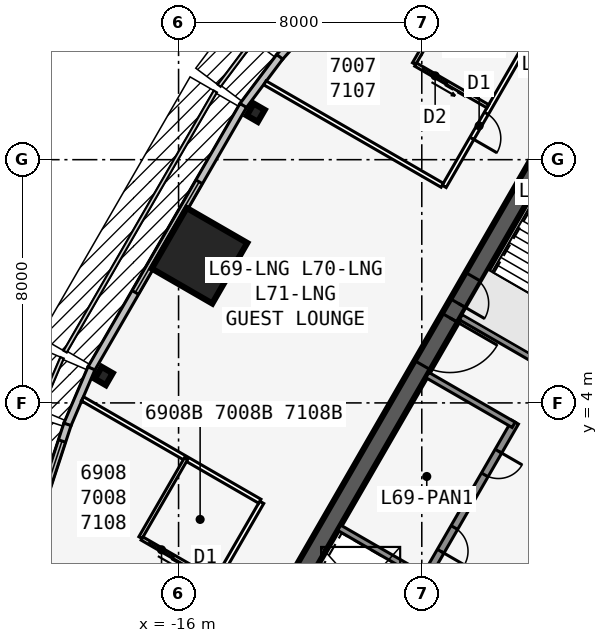
"""IFC4 building model, lengths in metres.
Left out: names, types, materials, properties, quantities, classifications, styles, units other than length and angle.
Written with IfcOpenShell. Run it as: python <this file> out.ifc"""

import sys

from ifc_helpers import new_model, si_unit, direction, frame, frame_2d, origin, origin_2d, place, context, subcontext, project, spatial, rectangle, i_section, extrude, element, fill, save


model = new_model("IFC4")
c1 = context("Model", 3, precision=1e-05, world=origin(), true_north=direction((0.0, 1.0)))
c2 = subcontext(c1, "Body", "Model", "MODEL_VIEW")
j1 = project(units=[si_unit("LENGTHUNIT", "METRE"), si_unit("PLANEANGLEUNIT", "RADIAN")], contexts=[c1])
p1 = place(None, origin())
s1 = spatial("IfcSite", under=j1, at=p1, CompositionType="ELEMENT")
p2 = place(p1, origin())
s2 = spatial("IfcBuilding", under=s1, at=p2, CompositionType="ELEMENT")
p3 = place(p2, frame((0.0, 0.0, 260.9)))
s3 = spatial("IfcBuildingStorey", under=s2, at=p3, CompositionType="ELEMENT", Elevation=260.9)
p4 = place(p3, frame((0.0, 19.052, 0.0), z_axis=(0.0, 0.0, 1.0), x_axis=(-0.499999749417, -0.866025548458, 0.0)))
e1 = element("IfcWall", 1, at=p4, inside=s3, PredefinedType="SHEAR", context=c2, shape_type="SweptSolid", body=[
    extrude(rectangle(XDim=33.0, YDim=0.6, at=frame_2d((16.5, 0.0))), origin(), (0.0, 0.0, 1.0), 3.6),
])
p5 = place(p4, frame((14.15, 0.0, 0.0)))
e2 = element("IfcOpeningElement", 2, at=p5, cuts=e1, PredefinedType="OPENING", context=c2, shape_type="SweptSolid", body=[
    extrude(rectangle(XDim=1.8, YDim=2.13, at=frame_2d((0.9, 1.065))), frame((0.0, 0.31, 0.0), z_axis=(0.0, -1.0, 0.0), x_axis=(1.0, 0.0, 0.0)), (0.0, 0.0, 1.0), 0.62),
])
p6 = place(p4, frame((12.6, 0.0, 0.0)))
e3 = element("IfcOpeningElement", 3, at=p6, cuts=e1, PredefinedType="OPENING", context=c2, shape_type="SweptSolid", body=[
    extrude(rectangle(XDim=1.0, YDim=2.13, at=frame_2d((0.5, 1.065))), frame((0.0, 0.31, 0.0), z_axis=(0.0, -1.0, 0.0), x_axis=(1.0, 0.0, 0.0)), (0.0, 0.0, 1.0), 0.62),
])
p7 = place(p3, frame((-4.929, 3.365, 0.0), z_axis=(0.0, 0.0, 1.0), x_axis=(-0.499991433582, -0.866030349552, 0.0)))
e4 = element("IfcWall", 4, at=p7, inside=s3, PredefinedType="SOLIDWALL", context=c2, shape_type="SweptSolid", body=[
    extrude(rectangle(XDim=10.633, YDim=0.25, at=frame_2d((5.316, 0.0))), origin(), (0.0, 0.0, 1.0), 3.435),
])
p8 = place(p7, frame((9.164, 0.0, 0.0)))
e5 = element("IfcOpeningElement", 5, at=p8, cuts=e4, PredefinedType="OPENING", context=c2, shape_type="SweptSolid", body=[
    extrude(rectangle(XDim=0.9, YDim=2.13, at=frame_2d((0.45, 1.065))), frame((0.0, 0.135, 0.0), z_axis=(0.0, -1.0, 0.0), x_axis=(1.0, 0.0, 0.0)), (0.0, 0.0, 1.0), 0.27),
])
p9 = place(p7, frame((1.1, 0.0, 0.0)))
e6 = element("IfcOpeningElement", 6, at=p9, cuts=e4, PredefinedType="OPENING", context=c2, shape_type="SweptSolid", body=[
    extrude(rectangle(XDim=0.9, YDim=2.13, at=frame_2d((0.45, 1.065))), frame((0.0, 0.135, 0.0), z_axis=(0.0, -1.0, 0.0), x_axis=(1.0, 0.0, 0.0)), (0.0, 0.0, 1.0), 0.27),
])
p10 = place(p7, frame((4.0, 0.0, 0.0)))
e7 = element("IfcOpeningElement", 7, at=p10, cuts=e4, PredefinedType="OPENING", context=c2, shape_type="SweptSolid", body=[
    extrude(rectangle(XDim=0.9, YDim=2.13, at=frame_2d((0.45, 1.065))), frame((0.0, 0.135, 0.0), z_axis=(0.0, -1.0, 0.0), x_axis=(1.0, 0.0, 0.0)), (0.0, 0.0, 1.0), 0.27),
])
for number, where, z_axis, x_axis in (
    (8, (-3.879, 5.184, 0.0), (0.0, 0.0, 1.0), (-0.866, 0.5, 0.0)),
    (9, (-4.979, 3.279, 0.0), (0.0, 0.0, 1.0), (-0.866, 0.5, 0.0)),
    (10, (-7.879, -1.744, 0.0), (0.0, 0.0, 1.0), (-0.866, 0.5, 0.0)),
):
    element("IfcWall", number, at=place(p3, frame(where, z_axis=z_axis, x_axis=x_axis)), inside=s3, PredefinedType="SOLIDWALL", context=c2, shape_type="SweptSolid", body=[
        extrude(rectangle(XDim=3.275, YDim=0.2, at=frame_2d((1.637, 0.0))), origin(), (0.0, 0.0, 1.0), 3.435),
    ])
for number, where, z_axis, x_axis in (
    (11, (-13.461, 13.545, 0.0), (0.0, 0.0, 1.0), (-0.866, 0.5, 0.0)),
    (12, (-18.461, 4.885, 0.0), (0.0, 0.0, 1.0), (-0.866, 0.5, 0.0)),
):
    element("IfcColumn", number, at=place(p3, frame(where, z_axis=z_axis, x_axis=x_axis)), inside=s3, PredefinedType="COLUMN", context=c2, shape_type="SweptSolid", body=[
        extrude(i_section(OverallWidth=0.419, OverallDepth=0.455, WebThickness=0.042, FlangeThickness=0.068, at=origin_2d()), origin(), (0.0, 0.0, 1.0), 3.6),
    ])
p11 = place(p3, frame((-15.312, 8.84, 0.0), z_axis=(0.0, 0.0, 1.0), x_axis=(-0.866025403784, 0.5, 0.0)))
e13 = element("IfcColumn", 13, at=p11, inside=s3, PredefinedType="COLUMN", context=c2, shape_type="SweptSolid", body=[
    extrude(rectangle(XDim=2.3, YDim=2.3, at=origin_2d()), origin(), (0.0, 0.0, 1.0), 3.6),
])
p12 = place(p3, frame((-7.907, 20.701, 0.0), z_axis=(0.0, 0.0, 1.0), x_axis=(-0.667303550892, -0.744785855778, 0.0)))
e14 = element("IfcWall", 14, at=p12, inside=s3, PredefinedType="STANDARD", context=c2, shape_type="SweptSolid", body=[
    extrude(rectangle(XDim=7.153, YDim=0.25, at=frame_2d((3.576, 0.0))), origin(), (0.0, 0.0, 1.0), 3.435),
])
p13 = place(p12, frame((2.376, 0.0, 0.45)))
e15 = element("IfcOpeningElement", 15, at=p13, cuts=e14, PredefinedType="OPENING", context=c2, shape_type="SweptSolid", body=[
    extrude(rectangle(XDim=4.2, YDim=2.6, at=frame_2d((2.1, 1.3))), frame((0.0, 0.135, 0.0), z_axis=(0.0, -1.0, 0.0), x_axis=(1.0, 0.0, 0.0)), (0.0, 0.0, 1.0), 0.27),
])
p14 = place(p3, frame((-12.673, 15.382, 0.0), z_axis=(0.0, 0.0, 1.0), x_axis=(-0.599650843534, -0.800261748335, 0.0)))
e16 = element("IfcWall", 16, at=p14, inside=s3, PredefinedType="STANDARD", context=c2, shape_type="SweptSolid", body=[
    extrude(rectangle(XDim=2.014, YDim=0.25, at=frame_2d((1.007, 0.0))), origin(), (0.0, 0.0, 1.0), 3.435),
])
p15 = place(p3, frame((-13.873, 13.783, 0.0), z_axis=(0.0, 0.0, 1.0), x_axis=(-0.499993662806, -0.866029062534, 0.0)))
e17 = element("IfcWall", 17, at=p15, inside=s3, PredefinedType="STANDARD", context=c2, shape_type="SweptSolid", body=[
    extrude(rectangle(XDim=10.0, YDim=0.25, at=frame_2d((5.0, 0.0))), origin(), (0.0, 0.0, 1.0), 3.435),
])
p16 = place(p15, frame((2.9, 0.0, 0.45)))
e18 = element("IfcOpeningElement", 18, at=p16, cuts=e17, PredefinedType="OPENING", context=c2, shape_type="SweptSolid", body=[
    extrude(rectangle(XDim=4.2, YDim=2.6, at=frame_2d((2.1, 1.3))), frame((0.0, 0.135, 0.0), z_axis=(0.0, -1.0, 0.0), x_axis=(1.0, 0.0, 0.0)), (0.0, 0.0, 1.0), 0.27),
])
p17 = place(p3, frame((-18.866, 5.136, 0.0), z_axis=(0.0, 0.0, 1.0), x_axis=(-0.393290226175, -0.91941437774, 0.0)))
e19 = element("IfcWall", 19, at=p17, inside=s3, PredefinedType="STANDARD", context=c2, shape_type="SweptSolid", body=[
    extrude(rectangle(XDim=2.014, YDim=0.25, at=frame_2d((1.007, 0.0))), origin(), (0.0, 0.0, 1.0), 3.435),
])
p18 = place(p3, frame((-19.654, 3.294, 0.0), z_axis=(0.0, 0.0, 1.0), x_axis=(-0.311328857048, -0.95030223759, 0.0)))
e20 = element("IfcWall", 20, at=p18, inside=s3, PredefinedType="STANDARD", context=c2, shape_type="SweptSolid", body=[
    extrude(rectangle(XDim=7.153, YDim=0.25, at=frame_2d((3.576, 0.0))), origin(), (0.0, 0.0, 1.0), 3.435),
])
p19 = place(p18, frame((0.577, 0.0, 0.45)))
e21 = element("IfcOpeningElement", 21, at=p19, cuts=e20, PredefinedType="OPENING", context=c2, shape_type="SweptSolid", body=[
    extrude(rectangle(XDim=4.2, YDim=2.6, at=frame_2d((2.1, 1.3))), frame((0.0, 0.135, 0.0), z_axis=(0.0, -1.0, 0.0), x_axis=(1.0, 0.0, 0.0)), (0.0, 0.0, 1.0), 0.27),
])
p20 = place(p3, frame((-0.35, 23.096, 0.0), z_axis=(0.0, 0.0, 1.0), x_axis=(-0.499996044987, -0.8660276872, 0.0)))
e22 = element("IfcWall", 22, at=p20, inside=s3, PredefinedType="PARTITIONING", context=c2, shape_type="SweptSolid", body=[
    extrude(rectangle(XDim=13.827, YDim=0.15, at=frame_2d((6.913, 0.0))), origin(), (0.0, 0.0, 1.0), 3.435),
])
p21 = place(p20, frame((3.652, 0.0, 0.0)))
e23 = element("IfcOpeningElement", 23, at=p21, cuts=e22, PredefinedType="OPENING", context=c2, shape_type="SweptSolid", body=[
    extrude(rectangle(XDim=0.95, YDim=2.13, at=frame_2d((0.475, 1.065))), frame((0.0, 0.085, 0.0), z_axis=(0.0, -1.0, 0.0), x_axis=(1.0, 0.0, 0.0)), (0.0, 0.0, 1.0), 0.17),
])
p22 = place(p20, frame((11.052, 0.0, 0.0)))
e24 = element("IfcOpeningElement", 24, at=p22, cuts=e22, PredefinedType="OPENING", context=c2, shape_type="SweptSolid", body=[
    extrude(rectangle(XDim=0.95, YDim=2.13, at=frame_2d((0.475, 1.065))), frame((0.0, 0.085, 0.0), z_axis=(0.0, -1.0, 0.0), x_axis=(1.0, 0.0, 0.0)), (0.0, 0.0, 1.0), 0.17),
])
p23 = place(p3, frame((-13.263, 0.729, 0.0), z_axis=(0.0, 0.0, 1.0), x_axis=(-0.500001642027, -0.866024455758, 0.0)))
e25 = element("IfcWall", 25, at=p23, inside=s3, PredefinedType="PARTITIONING", context=c2, shape_type="SweptSolid", body=[
    extrude(rectangle(XDim=13.827, YDim=0.15, at=frame_2d((6.914, 0.0))), origin(), (0.0, 0.0, 1.0), 3.435),
])
p24 = place(p23, frame((3.225, 0.0, 0.0)))
e26 = element("IfcOpeningElement", 26, at=p24, cuts=e25, PredefinedType="OPENING", context=c2, shape_type="SweptSolid", body=[
    extrude(rectangle(XDim=0.95, YDim=2.13, at=frame_2d((0.475, 1.065))), frame((0.0, 0.085, 0.0), z_axis=(0.0, -1.0, 0.0), x_axis=(1.0, 0.0, 0.0)), (0.0, 0.0, 1.0), 0.17),
])
p25 = place(p23, frame((9.225, 0.0, 0.0)))
e27 = element("IfcOpeningElement", 27, at=p25, cuts=e25, PredefinedType="OPENING", context=c2, shape_type="SweptSolid", body=[
    extrude(rectangle(XDim=0.95, YDim=2.13, at=frame_2d((0.475, 1.065))), frame((0.0, 0.085, 0.0), z_axis=(0.0, -1.0, 0.0), x_axis=(1.0, 0.0, 0.0)), (0.0, 0.0, 1.0), 0.17),
])
for number, where, z_axis, x_axis in (
    (28, (-7.329, 11.159, 0.0), (0.0, 0.0, 1.0), (-0.866, 0.5, 0.0)),
    (29, (-13.329, 0.767, 0.0), (0.0, 0.0, 1.0), (-0.866, 0.5, 0.0)),
):
    element("IfcWall", number, at=place(p3, frame(where, z_axis=z_axis, x_axis=x_axis)), inside=s3, PredefinedType="PARTITIONING", context=c2, shape_type="SweptSolid", body=[
        extrude(rectangle(XDim=6.732, YDim=0.15, at=frame_2d((3.366, 0.0))), origin(), (0.0, 0.0, 1.0), 3.435),
    ])
p26 = place(p3, frame((-6.753, 17.755, 0.0), z_axis=(0.0, 0.0, 1.0), x_axis=(-0.50002537861, -0.866010750942, 0.0)))
e30 = element("IfcWall", 30, at=p26, inside=s3, PredefinedType="PLUMBINGWALL", context=c2, shape_type="SweptSolid", body=[
    extrude(rectangle(XDim=3.0, YDim=0.12, at=frame_2d((1.5, 0.0))), origin(), (0.0, 0.0, 1.0), 3.435),
])
p27 = place(p3, frame((-5.829, 13.757, 0.0), z_axis=(0.0, 0.0, 1.0), x_axis=(-0.865997131366, 0.500048966069, 0.0)))
e31 = element("IfcWall", 31, at=p27, inside=s3, PredefinedType="PLUMBINGWALL", context=c2, shape_type="SweptSolid", body=[
    extrude(rectangle(XDim=2.74, YDim=0.12, at=frame_2d((1.37, 0.0))), origin(), (0.0, 0.0, 1.0), 3.435),
])
p28 = place(p27, frame((1.55, 0.0, 0.0)))
e32 = element("IfcOpeningElement", 32, at=p28, cuts=e31, PredefinedType="OPENING", context=c2, shape_type="SweptSolid", body=[
    extrude(rectangle(XDim=0.9, YDim=2.13, at=frame_2d((0.45, 1.065))), frame((0.0, 0.07, 0.0), z_axis=(0.0, -1.0, 0.0), x_axis=(1.0, 0.0, 0.0)), (0.0, 0.0, 1.0), 0.14),
])
p29 = place(p3, frame((-15.753, 2.167, 0.0), z_axis=(0.0, 0.0, 1.0), x_axis=(-0.499990139034, -0.866031096941, 0.0)))
e33 = element("IfcWall", 33, at=p29, inside=s3, PredefinedType="PLUMBINGWALL", context=c2, shape_type="SweptSolid", body=[
    extrude(rectangle(XDim=3.0, YDim=0.12, at=frame_2d((1.5, 0.0))), origin(), (0.0, 0.0, 1.0), 3.435),
])
p30 = place(p3, frame((-14.829, -1.831, 0.0), z_axis=(0.0, 0.0, 1.0), x_axis=(-0.866035715982, 0.499982138324, 0.0)))
e34 = element("IfcWall", 34, at=p30, inside=s3, PredefinedType="PLUMBINGWALL", context=c2, shape_type="SweptSolid", body=[
    extrude(rectangle(XDim=2.74, YDim=0.12, at=frame_2d((1.37, 0.0))), origin(), (0.0, 0.0, 1.0), 3.435),
])
p31 = place(p30, frame((1.55, 0.0, 0.0)))
e35 = element("IfcOpeningElement", 35, at=p31, cuts=e34, PredefinedType="OPENING", context=c2, shape_type="SweptSolid", body=[
    extrude(rectangle(XDim=0.9, YDim=2.13, at=frame_2d((0.45, 1.065))), frame((0.0, 0.07, 0.0), z_axis=(0.0, -1.0, 0.0), x_axis=(1.0, 0.0, 0.0)), (0.0, 0.0, 1.0), 0.14),
])
p32 = place(p16, origin())
e36 = element("IfcWindow", 36, at=p32, inside=s3, PartitioningType="SINGLE_PANEL", PredefinedType="WINDOW", context=c2, shape_type="SweptSolid", body=[
    extrude(rectangle(XDim=4.2, YDim=2.6, at=frame_2d((2.1, 1.3))), frame((0.0, 0.03, 0.0), z_axis=(0.0, -1.0, 0.0), x_axis=(1.0, 0.0, 0.0)), (0.0, 0.0, 1.0), 0.06),
])
fill(e18, e36)
p33 = place(p19, origin())
e37 = element("IfcWindow", 37, at=p33, inside=s3, PartitioningType="SINGLE_PANEL", PredefinedType="WINDOW", context=c2, shape_type="SweptSolid", body=[
    extrude(rectangle(XDim=4.2, YDim=2.6, at=frame_2d((2.1, 1.3))), frame((0.0, 0.03, 0.0), z_axis=(0.0, -1.0, 0.0), x_axis=(1.0, 0.0, 0.0)), (0.0, 0.0, 1.0), 0.06),
])
fill(e21, e37)
p34 = place(p28, origin())
e38 = element("IfcDoor", 38, at=p34, inside=s3, OperationType="SLIDING_TO_LEFT", PredefinedType="DOOR", context=c2, shape_type="SweptSolid", body=[
    extrude(rectangle(XDim=0.9, YDim=2.13, at=frame_2d((0.45, 1.065))), frame((0.0, 0.025, 0.0), z_axis=(0.0, -1.0, 0.0), x_axis=(1.0, 0.0, 0.0)), (0.0, 0.0, 1.0), 0.05),
])
fill(e32, e38)
p35 = place(p22, origin())
e39 = element("IfcDoor", 39, at=p35, inside=s3, OperationType="SINGLE_SWING_RIGHT", PredefinedType="DOOR", context=c2, shape_type="SweptSolid", body=[
    extrude(rectangle(XDim=0.95, YDim=2.13, at=frame_2d((0.475, 1.065))), frame((0.0, 0.025, 0.0), z_axis=(0.0, -1.0, 0.0), x_axis=(1.0, 0.0, 0.0)), (0.0, 0.0, 1.0), 0.05),
])
fill(e24, e39)
p36 = place(p31, origin())
e40 = element("IfcDoor", 40, at=p36, inside=s3, OperationType="SLIDING_TO_LEFT", PredefinedType="DOOR", context=c2, shape_type="SweptSolid", body=[
    extrude(rectangle(XDim=0.9, YDim=2.13, at=frame_2d((0.45, 1.065))), frame((0.0, 0.025, 0.0), z_axis=(0.0, -1.0, 0.0), x_axis=(1.0, 0.0, 0.0)), (0.0, 0.0, 1.0), 0.05),
])
fill(e35, e40)
p37 = place(p5, origin())
e41 = element("IfcDoor", 41, at=p37, inside=s3, OperationType="DOUBLE_DOOR_SINGLE_SWING", PredefinedType="DOOR", context=c2, shape_type="SweptSolid", body=[
    extrude(rectangle(XDim=1.8, YDim=2.13, at=frame_2d((0.9, 1.065))), frame((0.0, 0.025, 0.0), z_axis=(0.0, -1.0, 0.0), x_axis=(1.0, 0.0, 0.0)), (0.0, 0.0, 1.0), 0.05),
])
fill(e2, e41)
p38 = place(p6, origin())
e42 = element("IfcDoor", 42, at=p38, inside=s3, OperationType="SINGLE_SWING_RIGHT", PredefinedType="DOOR", context=c2, shape_type="SweptSolid", body=[
    extrude(rectangle(XDim=1.0, YDim=2.13, at=frame_2d((0.5, 1.065))), frame((0.0, 0.025, 0.0), z_axis=(0.0, -1.0, 0.0), x_axis=(1.0, 0.0, 0.0)), (0.0, 0.0, 1.0), 0.05),
])
fill(e3, e42)
p39 = place(p9, origin())
e43 = element("IfcDoor", 43, at=p39, inside=s3, OperationType="SINGLE_SWING_LEFT", PredefinedType="DOOR", context=c2, shape_type="SweptSolid", body=[
    extrude(rectangle(XDim=0.9, YDim=2.13, at=frame_2d((0.45, 1.065))), frame((0.0, 0.025, 0.0), z_axis=(0.0, -1.0, 0.0), x_axis=(1.0, 0.0, 0.0)), (0.0, 0.0, 1.0), 0.05),
])
fill(e6, e43)
p40 = place(p10, origin())
e44 = element("IfcDoor", 44, at=p40, inside=s3, OperationType="SINGLE_SWING_RIGHT", PredefinedType="DOOR", context=c2, shape_type="SweptSolid", body=[
    extrude(rectangle(XDim=0.9, YDim=2.13, at=frame_2d((0.45, 1.065))), frame((0.0, 0.025, 0.0), z_axis=(0.0, -1.0, 0.0), x_axis=(1.0, 0.0, 0.0)), (0.0, 0.0, 1.0), 0.05),
])
fill(e7, e44)
save(model, sys.argv[1])
